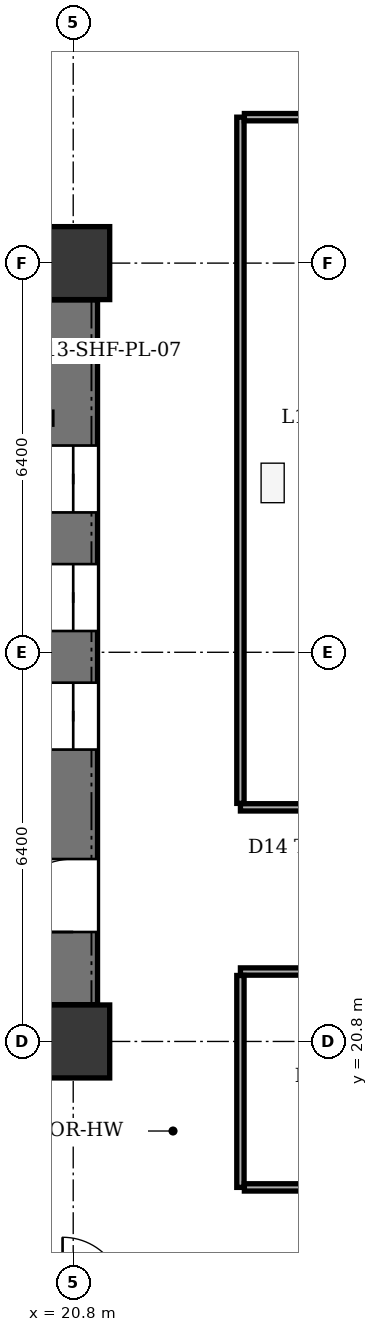
"""IFC4 building model, lengths in metres.
Left out: names, types, materials, properties, quantities, classifications, styles, units other than length and angle.
Written with IfcOpenShell. Run it as: python <this file> out.ifc"""

import sys

from ifc_helpers import new_model, si_unit, direction, frame, frame_2d, origin, origin_2d, place, context, subcontext, project, spatial, rectangle, extrude, element, fill, save


model = new_model("IFC4")
c1 = context("Model", 3, precision=1e-05, world=origin(), true_north=direction((0.0, 1.0)))
c2 = subcontext(c1, "Body", "Model", "MODEL_VIEW")
j1 = project(units=[si_unit("LENGTHUNIT", "METRE"), si_unit("PLANEANGLEUNIT", "RADIAN")], contexts=[c1])
p1 = place(None, origin())
s1 = spatial("IfcSite", under=j1, at=p1, CompositionType="ELEMENT")
p2 = place(p1, origin())
s2 = spatial("IfcBuilding", under=s1, at=p2, CompositionType="ELEMENT")
p3 = place(p2, frame((0.0, 0.0, 55.5)))
s3 = spatial("IfcBuildingStorey", under=s2, at=p3, CompositionType="ELEMENT", Elevation=55.5)
for number, where, z_axis, x_axis in (
    (1, (20.8, 20.8, 0.0), (0.0, 0.0, 1.0), (1.0, 0.0, 0.0)),
    (2, (20.8, 33.6, 0.0), (0.0, 0.0, 1.0), (1.0, 0.0, 0.0)),
):
    element("IfcColumn", number, at=place(p3, frame(where, z_axis=z_axis, x_axis=x_axis)), inside=s3, PredefinedType="COLUMN", context=c2, shape_type="SweptSolid", body=[
        extrude(rectangle(XDim=1.2, YDim=1.2, at=origin_2d()), origin(), (0.0, 0.0, 1.0), 3.9),
    ])
p4 = place(p3, frame((20.8, 21.405, 0.0), z_axis=(0.0, 0.0, 1.0), x_axis=(0.0, 1.0, 0.0)))
e3 = element("IfcWall", 3, at=p4, inside=s3, PredefinedType="SHEAR", context=c2, shape_type="SweptSolid", body=[
    extrude(rectangle(XDim=11.59, YDim=0.8, at=frame_2d((5.795, 0.0))), origin(), (0.0, 0.0, 1.0), 3.6),
])
p5 = place(p4, frame((1.195, 0.0, 0.0)))
e4 = element("IfcOpeningElement", 4, at=p5, cuts=e3, PredefinedType="OPENING", context=c2, shape_type="SweptSolid", body=[
    extrude(rectangle(XDim=1.2, YDim=2.15, at=frame_2d((0.6, 1.075))), frame((0.0, 0.41, 0.0), z_axis=(0.0, -1.0, 0.0), x_axis=(1.0, 0.0, 0.0)), (0.0, 0.0, 1.0), 0.82),
])
p6 = place(p4, frame((4.195, 0.0, 0.0)))
e5 = element("IfcOpeningElement", 5, at=p6, cuts=e3, PredefinedType="OPENING", context=c2, shape_type="SweptSolid", body=[
    extrude(rectangle(XDim=1.1, YDim=2.1, at=frame_2d((0.55, 1.05))), frame((0.0, 0.41, 0.0), z_axis=(0.0, -1.0, 0.0), x_axis=(1.0, 0.0, 0.0)), (0.0, 0.0, 1.0), 0.82),
])
p7 = place(p4, frame((6.145, 0.0, 0.0)))
e6 = element("IfcOpeningElement", 6, at=p7, cuts=e3, PredefinedType="OPENING", context=c2, shape_type="SweptSolid", body=[
    extrude(rectangle(XDim=1.1, YDim=2.1, at=frame_2d((0.55, 1.05))), frame((0.0, 0.41, 0.0), z_axis=(0.0, -1.0, 0.0), x_axis=(1.0, 0.0, 0.0)), (0.0, 0.0, 1.0), 0.82),
])
p8 = place(p4, frame((8.095, 0.0, 0.0)))
e7 = element("IfcOpeningElement", 7, at=p8, cuts=e3, PredefinedType="OPENING", context=c2, shape_type="SweptSolid", body=[
    extrude(rectangle(XDim=1.1, YDim=2.1, at=frame_2d((0.55, 1.05))), frame((0.0, 0.41, 0.0), z_axis=(0.0, -1.0, 0.0), x_axis=(1.0, 0.0, 0.0)), (0.0, 0.0, 1.0), 0.82),
])
p9 = place(p3, frame((23.55, 24.65, 0.0), z_axis=(0.0, 0.0, 1.0), x_axis=(1.0, 0.0, 0.0)))
e8 = element("IfcWall", 8, at=p9, inside=s3, PredefinedType="PARTITIONING", context=c2, shape_type="SweptSolid", body=[
    extrude(rectangle(XDim=8.9, YDim=0.12, at=frame_2d((4.45, 0.0))), origin(), (0.0, 0.0, 1.0), 3.135),
])
p10 = place(p9, frame((1.0, 0.0, 0.0)))
e9 = element("IfcOpeningElement", 9, at=p10, cuts=e8, PredefinedType="OPENING", context=c2, shape_type="SweptSolid", body=[
    extrude(rectangle(XDim=0.95, YDim=2.1, at=frame_2d((0.475, 1.05))), frame((0.0, 0.07, 0.0), z_axis=(0.0, -1.0, 0.0), x_axis=(1.0, 0.0, 0.0)), (0.0, 0.0, 1.0), 0.14),
])
p11 = place(p9, frame((4.1, 0.0, 0.0)))
e10 = element("IfcOpeningElement", 10, at=p11, cuts=e8, PredefinedType="OPENING", context=c2, shape_type="SweptSolid", body=[
    extrude(rectangle(XDim=0.95, YDim=2.1, at=frame_2d((0.475, 1.05))), frame((0.0, 0.07, 0.0), z_axis=(0.0, -1.0, 0.0), x_axis=(1.0, 0.0, 0.0)), (0.0, 0.0, 1.0), 0.14),
])
p12 = place(p9, frame((7.0, 0.0, 0.0)))
e11 = element("IfcOpeningElement", 11, at=p12, cuts=e8, PredefinedType="OPENING", context=c2, shape_type="SweptSolid", body=[
    extrude(rectangle(XDim=1.0, YDim=2.1, at=frame_2d((0.5, 1.05))), frame((0.0, 0.07, 0.0), z_axis=(0.0, -1.0, 0.0), x_axis=(1.0, 0.0, 0.0)), (0.0, 0.0, 1.0), 0.14),
])
p13 = place(p3, frame((23.55, 24.715, 0.0), z_axis=(0.0, 0.0, 1.0), x_axis=(0.0, 1.0, 0.0)))
e12 = element("IfcWall", 12, at=p13, inside=s3, PredefinedType="PARTITIONING", context=c2, shape_type="SweptSolid", body=[
    extrude(rectangle(XDim=11.285, YDim=0.12, at=frame_2d((5.643, 0.0))), origin(), (0.0, 0.0, 1.0), 3.6),
])
p14 = place(p3, frame((23.615, 36.0, 0.0), z_axis=(0.0, 0.0, 1.0), x_axis=(1.0, 0.0, 0.0)))
e13 = element("IfcWall", 13, at=p14, inside=s3, PredefinedType="PARTITIONING", context=c2, shape_type="SweptSolid", body=[
    extrude(rectangle(XDim=8.77, YDim=0.12, at=frame_2d((4.385, 0.0))), origin(), (0.0, 0.0, 1.0), 3.6),
])
p15 = place(p3, frame((23.55, 21.95, 0.0), z_axis=(0.0, 0.0, 1.0), x_axis=(1.0, 0.0, 0.0)))
e14 = element("IfcWall", 14, at=p15, inside=s3, PredefinedType="PARTITIONING", context=c2, shape_type="SweptSolid", body=[
    extrude(rectangle(XDim=8.9, YDim=0.12, at=frame_2d((4.45, 0.0))), origin(), (0.0, 0.0, 1.0), 3.135),
])
p16 = place(p15, frame((3.6, 0.0, 0.0)))
e15 = element("IfcOpeningElement", 15, at=p16, cuts=e14, PredefinedType="OPENING", context=c2, shape_type="SweptSolid", body=[
    extrude(rectangle(XDim=1.1, YDim=2.15, at=frame_2d((0.55, 1.075))), frame((0.0, 0.07, 0.0), z_axis=(0.0, -1.0, 0.0), x_axis=(1.0, 0.0, 0.0)), (0.0, 0.0, 1.0), 0.14),
])
p17 = place(p3, frame((23.55, 18.4, 0.0), z_axis=(0.0, 0.0, 1.0), x_axis=(0.0, 1.0, 0.0)))
e16 = element("IfcWall", 16, at=p17, inside=s3, PredefinedType="PARTITIONING", context=c2, shape_type="SweptSolid", body=[
    extrude(rectangle(XDim=3.485, YDim=0.12, at=frame_2d((1.743, 0.0))), origin(), (0.0, 0.0, 1.0), 3.6),
])
p18 = place(p3, frame((23.615, 18.4, 0.0), z_axis=(0.0, 0.0, 1.0), x_axis=(1.0, 0.0, 0.0)))
e17 = element("IfcWall", 17, at=p18, inside=s3, PredefinedType="PARTITIONING", context=c2, shape_type="SweptSolid", body=[
    extrude(rectangle(XDim=8.77, YDim=0.12, at=frame_2d((4.385, 0.0))), origin(), (0.0, 0.0, 1.0), 3.6),
])
p19 = place(p5, origin())
e18 = element("IfcDoor", 18, at=p19, inside=s3, OperationType="SINGLE_SWING_LEFT", PredefinedType="DOOR", context=c2, shape_type="SweptSolid", body=[
    extrude(rectangle(XDim=1.2, YDim=2.15, at=frame_2d((0.6, 1.075))), frame((0.0, 0.025, 0.0), z_axis=(0.0, -1.0, 0.0), x_axis=(1.0, 0.0, 0.0)), (0.0, 0.0, 1.0), 0.05),
])
fill(e4, e18)
p20 = place(p6, origin())
e19 = element("IfcDoor", 19, at=p20, inside=s3, OperationType="DOUBLE_DOOR_SLIDING", PredefinedType="DOOR", context=c2, shape_type="SweptSolid", body=[
    extrude(rectangle(XDim=1.1, YDim=2.1, at=frame_2d((0.55, 1.05))), frame((0.0, 0.025, 0.0), z_axis=(0.0, -1.0, 0.0), x_axis=(1.0, 0.0, 0.0)), (0.0, 0.0, 1.0), 0.05),
])
fill(e5, e19)
p21 = place(p7, origin())
e20 = element("IfcDoor", 20, at=p21, inside=s3, OperationType="DOUBLE_DOOR_SLIDING", PredefinedType="DOOR", context=c2, shape_type="SweptSolid", body=[
    extrude(rectangle(XDim=1.1, YDim=2.1, at=frame_2d((0.55, 1.05))), frame((0.0, 0.025, 0.0), z_axis=(0.0, -1.0, 0.0), x_axis=(1.0, 0.0, 0.0)), (0.0, 0.0, 1.0), 0.05),
])
fill(e6, e20)
p22 = place(p8, origin())
e21 = element("IfcDoor", 21, at=p22, inside=s3, OperationType="DOUBLE_DOOR_SLIDING", PredefinedType="DOOR", context=c2, shape_type="SweptSolid", body=[
    extrude(rectangle(XDim=1.1, YDim=2.1, at=frame_2d((0.55, 1.05))), frame((0.0, 0.025, 0.0), z_axis=(0.0, -1.0, 0.0), x_axis=(1.0, 0.0, 0.0)), (0.0, 0.0, 1.0), 0.05),
])
fill(e7, e21)
save(model, sys.argv[1])
